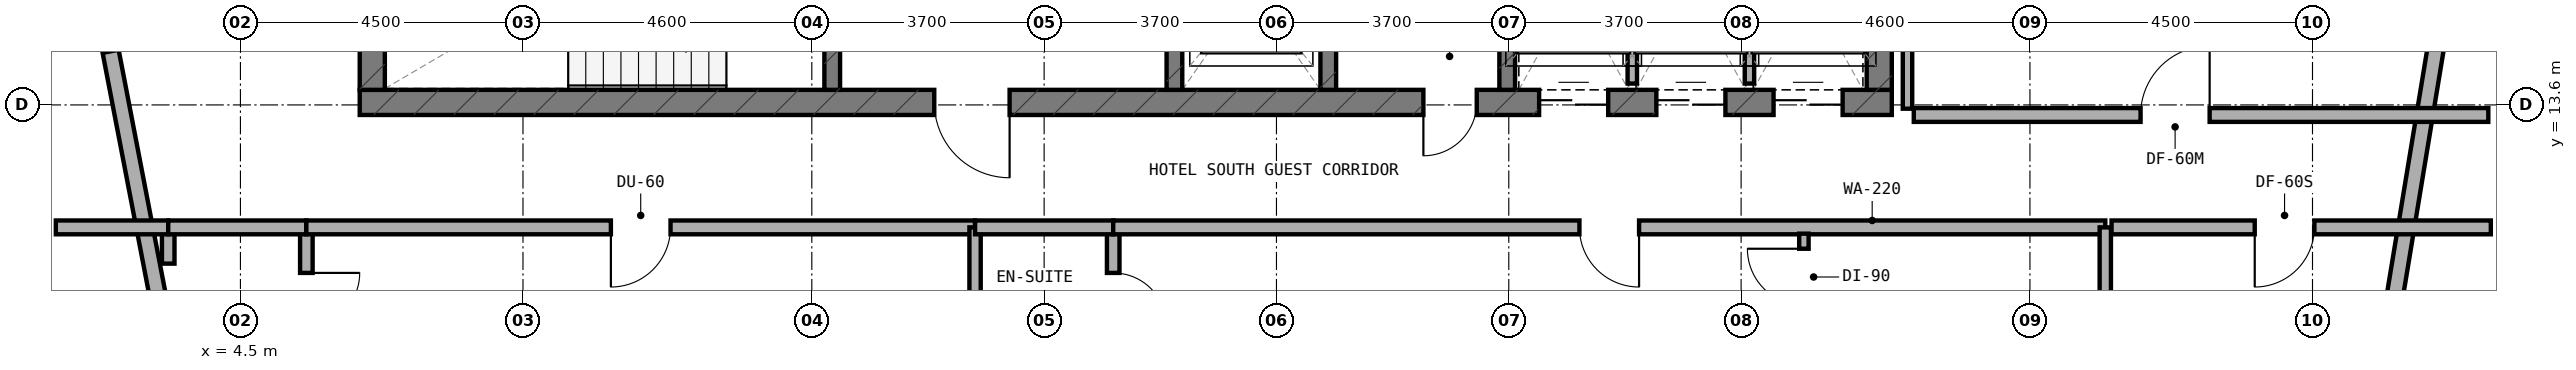
"""IFC4 building model, lengths in metres.
Left out: names, types, materials, properties, quantities, classifications, styles, units other than length and angle.
Written with IfcOpenShell. Run it as: python <this file> out.ifc"""

import sys

from ifc_helpers import new_model, si_unit, direction, frame, frame_2d, origin, place, context, subcontext, project, spatial, rectangle, extrude, element, fill, save


model = new_model("IFC4")
c1 = context("Model", 3, precision=1e-05, world=origin(), true_north=direction((0.0, 1.0)))
c2 = subcontext(c1, "Body", "Model", "MODEL_VIEW")
j1 = project(units=[si_unit("LENGTHUNIT", "METRE"), si_unit("PLANEANGLEUNIT", "RADIAN")], contexts=[c1])
p1 = place(None, origin())
s1 = spatial("IfcSite", under=j1, at=p1, CompositionType="ELEMENT")
p2 = place(p1, origin())
s2 = spatial("IfcBuilding", under=s1, at=p2, CompositionType="ELEMENT")
p3 = place(p2, frame((0.0, 0.0, 195.5)))
s3 = spatial("IfcBuildingStorey", under=s2, at=p3, CompositionType="ELEMENT", Elevation=195.5)
p4 = place(p3, frame((6.4, 13.64, 0.0), z_axis=(0.0, 0.0, 1.0), x_axis=(1.0, 0.0, 0.0)))
e1 = element("IfcWall", 1, at=p4, inside=s3, PredefinedType="SHEAR", context=c2, shape_type="SweptSolid", body=[
    extrude(rectangle(XDim=24.4, YDim=0.4, at=frame_2d((12.2, 0.0))), origin(), (0.0, 0.0, 1.0), 3.6),
])
p5 = place(p4, frame((9.15, 0.0, 0.0)))
e2 = element("IfcOpeningElement", 2, at=p5, cuts=e1, PredefinedType="OPENING", context=c2, shape_type="SweptSolid", body=[
    extrude(rectangle(XDim=1.2, YDim=2.15, at=frame_2d((0.6, 1.075))), frame((0.0, 0.21, 0.0), z_axis=(0.0, -1.0, 0.0), x_axis=(1.0, 0.0, 0.0)), (0.0, 0.0, 1.0), 0.42),
])
p6 = place(p4, frame((16.94, 0.0, 0.0)))
e3 = element("IfcOpeningElement", 3, at=p6, cuts=e1, PredefinedType="OPENING", context=c2, shape_type="SweptSolid", body=[
    extrude(rectangle(XDim=0.85, YDim=2.1, at=frame_2d((0.425, 1.05))), frame((0.0, 0.21, 0.0), z_axis=(0.0, -1.0, 0.0), x_axis=(1.0, 0.0, 0.0)), (0.0, 0.0, 1.0), 0.42),
])
p7 = place(p4, frame((18.783, 0.0, 0.0)))
e4 = element("IfcOpeningElement", 4, at=p7, cuts=e1, PredefinedType="OPENING", context=c2, shape_type="SweptSolid", body=[
    extrude(rectangle(XDim=1.1, YDim=2.15, at=frame_2d((0.55, 1.075))), frame((0.0, 0.21, 0.0), z_axis=(0.0, -1.0, 0.0), x_axis=(1.0, 0.0, 0.0)), (0.0, 0.0, 1.0), 0.42),
])
p8 = place(p4, frame((20.65, 0.0, 0.0)))
e5 = element("IfcOpeningElement", 5, at=p8, cuts=e1, PredefinedType="OPENING", context=c2, shape_type="SweptSolid", body=[
    extrude(rectangle(XDim=1.1, YDim=2.15, at=frame_2d((0.55, 1.075))), frame((0.0, 0.21, 0.0), z_axis=(0.0, -1.0, 0.0), x_axis=(1.0, 0.0, 0.0)), (0.0, 0.0, 1.0), 0.42),
])
p9 = place(p4, frame((22.517, 0.0, 0.0)))
e6 = element("IfcOpeningElement", 6, at=p9, cuts=e1, PredefinedType="OPENING", context=c2, shape_type="SweptSolid", body=[
    extrude(rectangle(XDim=1.1, YDim=2.15, at=frame_2d((0.55, 1.075))), frame((0.0, 0.21, 0.0), z_axis=(0.0, -1.0, 0.0), x_axis=(1.0, 0.0, 0.0)), (0.0, 0.0, 1.0), 0.42),
])
for number, where, z_axis, x_axis in (
    (7, (6.6, 13.84, 0.0), (0.0, 0.0, 1.0), (0.0, 1.0, 0.0)),
    (8, (30.6, 13.84, 0.0), (0.0, 0.0, 1.0), (0.0, 1.0, 0.0)),
):
    element("IfcWall", number, at=place(p3, frame(where, z_axis=z_axis, x_axis=x_axis)), inside=s3, PredefinedType="SHEAR", context=c2, shape_type="SweptSolid", body=[
        extrude(rectangle(XDim=3.16, YDim=0.4, at=frame_2d((1.58, 0.0))), origin(), (0.0, 0.0, 1.0), 3.6),
    ])
p10 = place(p3, frame((13.925, 13.84, 0.0), z_axis=(0.0, 0.0, 1.0), x_axis=(0.0, 1.0, 0.0)))
e9 = element("IfcWall", 9, at=p10, inside=s3, PredefinedType="STANDARD", context=c2, shape_type="SweptSolid", body=[
    extrude(rectangle(XDim=3.16, YDim=0.25, at=frame_2d((1.58, 0.0))), origin(), (0.0, 0.0, 1.0), 3.28),
])
p11 = place(p10, frame((0.98, 0.0, 0.0)))
e10 = element("IfcOpeningElement", 10, at=p11, cuts=e9, PredefinedType="OPENING", context=c2, shape_type="SweptSolid", body=[
    extrude(rectangle(XDim=1.1, YDim=2.15, at=frame_2d((0.55, 1.075))), frame((0.0, 0.135, 0.0), z_axis=(0.0, -1.0, 0.0), x_axis=(1.0, 0.0, 0.0)), (0.0, 0.0, 1.0), 0.27),
])
p12 = place(p3, frame((19.375, 13.84, 0.0), z_axis=(0.0, 0.0, 1.0), x_axis=(0.0, 1.0, 0.0)))
e11 = element("IfcWall", 11, at=p12, inside=s3, PredefinedType="STANDARD", context=c2, shape_type="SweptSolid", body=[
    extrude(rectangle(XDim=3.16, YDim=0.25, at=frame_2d((1.58, 0.0))), origin(), (0.0, 0.0, 1.0), 3.28),
])
p13 = place(p12, frame((0.98, 0.0, 0.0)))
e12 = element("IfcOpeningElement", 12, at=p13, cuts=e11, PredefinedType="OPENING", context=c2, shape_type="SweptSolid", body=[
    extrude(rectangle(XDim=1.1, YDim=2.15, at=frame_2d((0.55, 1.075))), frame((0.0, 0.135, 0.0), z_axis=(0.0, -1.0, 0.0), x_axis=(1.0, 0.0, 0.0)), (0.0, 0.0, 1.0), 0.27),
])
for number, where, z_axis, x_axis in (
    (13, (21.825, 13.84, 0.0), (0.0, 0.0, 1.0), (0.0, 1.0, 0.0)),
    (14, (24.675, 13.84, 0.0), (0.0, 0.0, 1.0), (0.0, 1.0, 0.0)),
):
    element("IfcWall", number, at=place(p3, frame(where, z_axis=z_axis, x_axis=x_axis)), inside=s3, PredefinedType="STANDARD", context=c2, shape_type="SweptSolid", body=[
        extrude(rectangle(XDim=3.16, YDim=0.25, at=frame_2d((1.58, 0.0))), origin(), (0.0, 0.0, 1.0), 3.28),
    ])
p14 = place(p3, frame((38.771, 10.313, 0.0), z_axis=(0.0, 0.0, 1.0), x_axis=(0.16277908586, 0.986662540693, 0.0)))
e15 = element("IfcWall", 15, at=p14, inside=s3, PredefinedType="STANDARD", context=c2, shape_type="SweptSolid", body=[
    extrude(rectangle(XDim=10.437, YDim=0.26, at=frame_2d((5.219, 0.0))), origin(), (0.0, 0.0, 1.0), 3.28),
])
p15 = place(p14, frame((5.81, 0.0, 0.85)))
e16 = element("IfcOpeningElement", 16, at=p15, cuts=e15, PredefinedType="OPENING", context=c2, shape_type="SweptSolid", body=[
    extrude(rectangle(XDim=2.1, YDim=1.5, at=frame_2d((1.05, 0.75))), frame((0.0, 0.14, 0.0), z_axis=(0.0, -1.0, 0.0), x_axis=(1.0, 0.0, 0.0)), (0.0, 0.0, 1.0), 0.28),
])
p16 = place(p3, frame((1.518, 19.199, 0.0), z_axis=(0.0, 0.0, 1.0), x_axis=(0.189254809039, -0.98192801022, 0.0)))
e17 = element("IfcWall", 17, at=p16, inside=s3, PredefinedType="STANDARD", context=c2, shape_type="SweptSolid", body=[
    extrude(rectangle(XDim=9.046, YDim=0.26, at=frame_2d((4.523, 0.0))), origin(), (0.0, 0.0, 1.0), 3.28),
])
p17 = place(p16, frame((2.733, 0.0, 0.85)))
e18 = element("IfcOpeningElement", 18, at=p17, cuts=e17, PredefinedType="OPENING", context=c2, shape_type="SweptSolid", body=[
    extrude(rectangle(XDim=2.1, YDim=1.5, at=frame_2d((1.05, 0.75))), frame((0.0, 0.14, 0.0), z_axis=(0.0, -1.0, 0.0), x_axis=(1.0, 0.0, 0.0)), (0.0, 0.0, 1.0), 0.28),
])
p18 = place(p3, frame((26.667, 13.94, 0.0), z_axis=(0.0, 0.0, 1.0), x_axis=(0.0, 1.0, 0.0)))
e19 = element("IfcWall", 19, at=p18, inside=s3, PredefinedType="PARTITIONING", context=c2, shape_type="SweptSolid", body=[
    extrude(rectangle(XDim=2.96, YDim=0.15, at=frame_2d((1.48, 0.0))), origin(), (0.0, 0.0, 1.0), 3.28),
])
p19 = place(p3, frame((28.533, 13.94, 0.0), z_axis=(0.0, 0.0, 1.0), x_axis=(0.0, 1.0, 0.0)))
e20 = element("IfcWall", 20, at=p19, inside=s3, PredefinedType="PARTITIONING", context=c2, shape_type="SweptSolid", body=[
    extrude(rectangle(XDim=2.96, YDim=0.15, at=frame_2d((1.48, 0.0))), origin(), (0.0, 0.0, 1.0), 2.955),
])
p20 = place(p3, frame((5.55, 9.45, 0.0), z_axis=(0.0, 0.0, 1.0), x_axis=(0.0, 1.0, 0.0)))
e21 = element("IfcWall", 21, at=p20, inside=s3, PredefinedType="PLUMBINGWALL", context=c2, shape_type="SweptSolid", body=[
    extrude(rectangle(XDim=2.1, YDim=0.2, at=frame_2d((1.05, 0.0))), origin(), (0.0, 0.0, 1.0), 3.28),
])
p21 = place(p20, frame((0.625, 0.0, 0.0)))
e22 = element("IfcOpeningElement", 22, at=p21, cuts=e21, PredefinedType="OPENING", context=c2, shape_type="SweptSolid", body=[
    extrude(rectangle(XDim=0.85, YDim=2.1, at=frame_2d((0.425, 1.05))), frame((0.0, 0.11, 0.0), z_axis=(0.0, -1.0, 0.0), x_axis=(1.0, 0.0, 0.0)), (0.0, 0.0, 1.0), 0.22),
])
p22 = place(p3, frame((3.35, 11.073, 0.0), z_axis=(0.0, 0.0, 1.0), x_axis=(0.0, 1.0, 0.0)))
e23 = element("IfcWall", 23, at=p22, inside=s3, PredefinedType="PLUMBINGWALL", context=c2, shape_type="SweptSolid", body=[
    extrude(rectangle(XDim=0.577, YDim=0.2, at=frame_2d((0.289, 0.0))), origin(), (0.0, 0.0, 1.0), 3.28),
])
p23 = place(p3, frame((1.56, 11.65, 0.0), z_axis=(0.0, 0.0, 1.0), x_axis=(1.0, 0.0, 0.0)))
e24 = element("IfcWall", 24, at=p23, inside=s3, PredefinedType="SOLIDWALL", context=c2, shape_type="SweptSolid", body=[
    extrude(rectangle(XDim=1.79, YDim=0.22, at=frame_2d((0.895, 0.0))), origin(), (0.0, 0.0, 1.0), 3.28),
])
p24 = place(p3, frame((3.35, 11.65, 0.0), z_axis=(0.0, 0.0, 1.0), x_axis=(1.0, 0.0, 0.0)))
e25 = element("IfcWall", 25, at=p24, inside=s3, PredefinedType="SOLIDWALL", context=c2, shape_type="SweptSolid", body=[
    extrude(rectangle(XDim=2.2, YDim=0.22, at=frame_2d((1.1, 0.0))), origin(), (0.0, 0.0, 1.0), 3.28),
])
p25 = place(p3, frame((5.55, 11.65, 0.0), z_axis=(0.0, 0.0, 1.0), x_axis=(1.0, 0.0, 0.0)))
e26 = element("IfcWall", 26, at=p25, inside=s3, PredefinedType="SOLIDWALL", context=c2, shape_type="SweptSolid", body=[
    extrude(rectangle(XDim=10.65, YDim=0.22, at=frame_2d((5.325, 0.0))), origin(), (0.0, 0.0, 1.0), 2.955),
])
p26 = place(p25, frame((4.85, 0.0, 0.0)))
e27 = element("IfcOpeningElement", 27, at=p26, cuts=e26, PredefinedType="OPENING", context=c2, shape_type="SweptSolid", body=[
    extrude(rectangle(XDim=0.95, YDim=2.1, at=frame_2d((0.475, 1.05))), frame((0.0, 0.12, 0.0), z_axis=(0.0, -1.0, 0.0), x_axis=(1.0, 0.0, 0.0)), (0.0, 0.0, 1.0), 0.24),
])
p27 = place(p3, frame((16.2, 5.46, 0.0), z_axis=(0.0, 0.0, 1.0), x_axis=(0.0, 1.0, 0.0)))
e28 = element("IfcWall", 28, at=p27, inside=s3, PredefinedType="SOLIDWALL", context=c2, shape_type="SweptSolid", body=[
    extrude(rectangle(XDim=6.19, YDim=0.18, at=frame_2d((3.095, 0.0))), origin(), (0.0, 0.0, 1.0), 2.895),
])
p28 = place(p3, frame((18.4, 9.45, 0.0), z_axis=(0.0, 0.0, 1.0), x_axis=(0.0, 1.0, 0.0)))
e29 = element("IfcWall", 29, at=p28, inside=s3, PredefinedType="PLUMBINGWALL", context=c2, shape_type="SweptSolid", body=[
    extrude(rectangle(XDim=2.1, YDim=0.2, at=frame_2d((1.05, 0.0))), origin(), (0.0, 0.0, 1.0), 2.895),
])
p29 = place(p28, frame((0.625, 0.0, 0.0)))
e30 = element("IfcOpeningElement", 30, at=p29, cuts=e29, PredefinedType="OPENING", context=c2, shape_type="SweptSolid", body=[
    extrude(rectangle(XDim=0.85, YDim=2.1, at=frame_2d((0.425, 1.05))), frame((0.0, 0.11, 0.0), z_axis=(0.0, -1.0, 0.0), x_axis=(1.0, 0.0, 0.0)), (0.0, 0.0, 1.0), 0.22),
])
p30 = place(p3, frame((16.2, 11.65, 0.0), z_axis=(0.0, 0.0, 1.0), x_axis=(1.0, 0.0, 0.0)))
e31 = element("IfcWall", 31, at=p30, inside=s3, PredefinedType="SOLIDWALL", context=c2, shape_type="SweptSolid", body=[
    extrude(rectangle(XDim=2.2, YDim=0.22, at=frame_2d((1.1, 0.0))), origin(), (0.0, 0.0, 1.0), 2.955),
])
p31 = place(p3, frame((18.4, 11.65, 0.0), z_axis=(0.0, 0.0, 1.0), x_axis=(1.0, 0.0, 0.0)))
e32 = element("IfcWall", 32, at=p31, inside=s3, PredefinedType="SOLIDWALL", context=c2, shape_type="SweptSolid", body=[
    extrude(rectangle(XDim=15.8, YDim=0.22, at=frame_2d((7.9, 0.0))), origin(), (0.0, 0.0, 1.0), 2.955),
])
p32 = place(p31, frame((7.425, 0.0, 0.0)))
e33 = element("IfcOpeningElement", 33, at=p32, cuts=e32, PredefinedType="OPENING", context=c2, shape_type="SweptSolid", body=[
    extrude(rectangle(XDim=0.95, YDim=2.1, at=frame_2d((0.475, 1.05))), frame((0.0, 0.12, 0.0), z_axis=(0.0, -1.0, 0.0), x_axis=(1.0, 0.0, 0.0)), (0.0, 0.0, 1.0), 0.24),
])
p33 = place(p3, frame((29.4, 6.047, 0.0), z_axis=(0.0, 0.0, 1.0), x_axis=(0.0, 1.0, 0.0)))
e34 = element("IfcWall", 34, at=p33, inside=s3, PredefinedType="PARTITIONING", context=c2, shape_type="SweptSolid", body=[
    extrude(rectangle(XDim=5.503, YDim=0.15, at=frame_2d((2.751, 0.0))), origin(), (0.0, 0.0, 1.0), 2.895),
])
p34 = place(p33, frame((4.363, 0.0, 0.0)))
e35 = element("IfcOpeningElement", 35, at=p34, cuts=e34, PredefinedType="OPENING", context=c2, shape_type="SweptSolid", body=[
    extrude(rectangle(XDim=0.9, YDim=2.1, at=frame_2d((0.45, 1.05))), frame((0.0, 0.085, 0.0), z_axis=(0.0, -1.0, 0.0), x_axis=(1.0, 0.0, 0.0)), (0.0, 0.0, 1.0), 0.17),
])
p35 = place(p3, frame((34.2, 6.872, 0.0), z_axis=(0.0, 0.0, 1.0), x_axis=(0.0, 1.0, 0.0)))
e36 = element("IfcWall", 36, at=p35, inside=s3, PredefinedType="SOLIDWALL", context=c2, shape_type="SweptSolid", body=[
    extrude(rectangle(XDim=4.778, YDim=0.18, at=frame_2d((2.389, 0.0))), origin(), (0.0, 0.0, 1.0), 2.895),
])
p36 = place(p3, frame((34.3, 11.65, 0.0), z_axis=(0.0, 0.0, 1.0), x_axis=(1.0, 0.0, 0.0)))
e37 = element("IfcWall", 37, at=p36, inside=s3, PredefinedType="SOLIDWALL", context=c2, shape_type="SweptSolid", body=[
    extrude(rectangle(XDim=6.04, YDim=0.22, at=frame_2d((3.02, 0.0))), origin(), (0.0, 0.0, 1.0), 2.895),
])
p37 = place(p36, frame((2.28, 0.0, 0.0)))
e38 = element("IfcOpeningElement", 38, at=p37, cuts=e37, PredefinedType="OPENING", context=c2, shape_type="SweptSolid", body=[
    extrude(rectangle(XDim=0.95, YDim=2.1, at=frame_2d((0.475, 1.05))), frame((0.0, 0.12, 0.0), z_axis=(0.0, -1.0, 0.0), x_axis=(1.0, 0.0, 0.0)), (0.0, 0.0, 1.0), 0.24),
])
p38 = place(p3, frame((31.05, 13.54, 0.0), z_axis=(0.0, 0.0, 1.0), x_axis=(0.0, 1.0, 0.0)))
e39 = element("IfcWall", 39, at=p38, inside=s3, PredefinedType="PARTITIONING", context=c2, shape_type="SweptSolid", body=[
    extrude(rectangle(XDim=6.66, YDim=0.15, at=frame_2d((3.33, 0.0))), origin(), (0.0, 0.0, 1.0), 2.955),
])
p39 = place(p3, frame((31.15, 13.44, 0.0), z_axis=(0.0, 0.0, 1.0), x_axis=(1.0, 0.0, 0.0)))
e40 = element("IfcWall", 40, at=p39, inside=s3, PredefinedType="SOLIDWALL", context=c2, shape_type="SweptSolid", body=[
    extrude(rectangle(XDim=9.15, YDim=0.22, at=frame_2d((4.575, 0.0))), origin(), (0.0, 0.0, 1.0), 2.895),
])
p40 = place(p39, frame((3.612, 0.0, 0.0)))
e41 = element("IfcOpeningElement", 41, at=p40, cuts=e40, PredefinedType="OPENING", context=c2, shape_type="SweptSolid", body=[
    extrude(rectangle(XDim=1.1, YDim=2.1, at=frame_2d((0.55, 1.05))), frame((0.0, 0.12, 0.0), z_axis=(0.0, -1.0, 0.0), x_axis=(1.0, 0.0, 0.0)), (0.0, 0.0, 1.0), 0.24),
])
p41 = place(p5, frame((1.2, 0.0, 0.0), z_axis=(0.0, 0.0, 1.0), x_axis=(-1.0, 0.0, 0.0)))
e42 = element("IfcDoor", 42, at=p41, inside=s3, OperationType="SINGLE_SWING_LEFT", PredefinedType="DOOR", context=c2, shape_type="SweptSolid", body=[
    extrude(rectangle(XDim=1.2, YDim=2.15, at=frame_2d((0.6, 1.075))), frame((0.0, 0.025, 0.0), z_axis=(0.0, -1.0, 0.0), x_axis=(1.0, 0.0, 0.0)), (0.0, 0.0, 1.0), 0.05),
])
fill(e2, e42)
p42 = place(p6, frame((0.85, 0.0, 0.0), z_axis=(0.0, 0.0, 1.0), x_axis=(-1.0, 0.0, 0.0)))
e43 = element("IfcDoor", 43, at=p42, inside=s3, OperationType="SINGLE_SWING_RIGHT", PredefinedType="DOOR", context=c2, shape_type="SweptSolid", body=[
    extrude(rectangle(XDim=0.85, YDim=2.1, at=frame_2d((0.425, 1.05))), frame((0.0, 0.025, 0.0), z_axis=(0.0, -1.0, 0.0), x_axis=(1.0, 0.0, 0.0)), (0.0, 0.0, 1.0), 0.05),
])
fill(e3, e43)
p43 = place(p7, frame((1.1, 0.0, 0.0), z_axis=(0.0, 0.0, 1.0), x_axis=(-1.0, 0.0, 0.0)))
e44 = element("IfcDoor", 44, at=p43, inside=s3, OperationType="DOUBLE_DOOR_SLIDING", PredefinedType="DOOR", context=c2, shape_type="SweptSolid", body=[
    extrude(rectangle(XDim=1.1, YDim=2.15, at=frame_2d((0.55, 1.075))), frame((0.0, 0.025, 0.0), z_axis=(0.0, -1.0, 0.0), x_axis=(1.0, 0.0, 0.0)), (0.0, 0.0, 1.0), 0.05),
])
fill(e4, e44)
p44 = place(p8, frame((1.1, 0.0, 0.0), z_axis=(0.0, 0.0, 1.0), x_axis=(-1.0, 0.0, 0.0)))
e45 = element("IfcDoor", 45, at=p44, inside=s3, OperationType="DOUBLE_DOOR_SLIDING", PredefinedType="DOOR", context=c2, shape_type="SweptSolid", body=[
    extrude(rectangle(XDim=1.1, YDim=2.15, at=frame_2d((0.55, 1.075))), frame((0.0, 0.025, 0.0), z_axis=(0.0, -1.0, 0.0), x_axis=(1.0, 0.0, 0.0)), (0.0, 0.0, 1.0), 0.05),
])
fill(e5, e45)
p45 = place(p9, frame((1.1, 0.0, 0.0), z_axis=(0.0, 0.0, 1.0), x_axis=(-1.0, 0.0, 0.0)))
e46 = element("IfcDoor", 46, at=p45, inside=s3, OperationType="DOUBLE_DOOR_SLIDING", PredefinedType="DOOR", context=c2, shape_type="SweptSolid", body=[
    extrude(rectangle(XDim=1.1, YDim=2.15, at=frame_2d((0.55, 1.075))), frame((0.0, 0.025, 0.0), z_axis=(0.0, -1.0, 0.0), x_axis=(1.0, 0.0, 0.0)), (0.0, 0.0, 1.0), 0.05),
])
fill(e6, e46)
p46 = place(p21, frame((0.85, 0.0, 0.0), z_axis=(0.0, 0.0, 1.0), x_axis=(-1.0, 0.0, 0.0)))
e47 = element("IfcDoor", 47, at=p46, inside=s3, OperationType="SINGLE_SWING_LEFT", PredefinedType="DOOR", context=c2, shape_type="SweptSolid", body=[
    extrude(rectangle(XDim=0.85, YDim=2.1, at=frame_2d((0.425, 1.05))), frame((0.0, 0.025, 0.0), z_axis=(0.0, -1.0, 0.0), x_axis=(1.0, 0.0, 0.0)), (0.0, 0.0, 1.0), 0.05),
])
fill(e22, e47)
p47 = place(p26, frame((0.95, 0.0, 0.0), z_axis=(0.0, 0.0, 1.0), x_axis=(-1.0, 0.0, 0.0)))
e48 = element("IfcDoor", 48, at=p47, inside=s3, OperationType="SINGLE_SWING_RIGHT", PredefinedType="DOOR", context=c2, shape_type="SweptSolid", body=[
    extrude(rectangle(XDim=0.95, YDim=2.1, at=frame_2d((0.475, 1.05))), frame((0.0, 0.025, 0.0), z_axis=(0.0, -1.0, 0.0), x_axis=(1.0, 0.0, 0.0)), (0.0, 0.0, 1.0), 0.05),
])
fill(e27, e48)
p48 = place(p29, frame((0.85, 0.0, 0.0), z_axis=(0.0, 0.0, 1.0), x_axis=(-1.0, 0.0, 0.0)))
e49 = element("IfcDoor", 49, at=p48, inside=s3, OperationType="SINGLE_SWING_RIGHT", PredefinedType="DOOR", context=c2, shape_type="SweptSolid", body=[
    extrude(rectangle(XDim=0.85, YDim=2.1, at=frame_2d((0.425, 1.05))), frame((0.0, 0.025, 0.0), z_axis=(0.0, -1.0, 0.0), x_axis=(1.0, 0.0, 0.0)), (0.0, 0.0, 1.0), 0.05),
])
fill(e30, e49)
p49 = place(p32, frame((0.95, 0.0, 0.0), z_axis=(0.0, 0.0, 1.0), x_axis=(-1.0, 0.0, 0.0)))
e50 = element("IfcDoor", 50, at=p49, inside=s3, OperationType="SINGLE_SWING_LEFT", PredefinedType="DOOR", context=c2, shape_type="SweptSolid", body=[
    extrude(rectangle(XDim=0.95, YDim=2.1, at=frame_2d((0.475, 1.05))), frame((0.0, 0.025, 0.0), z_axis=(0.0, -1.0, 0.0), x_axis=(1.0, 0.0, 0.0)), (0.0, 0.0, 1.0), 0.05),
])
fill(e33, e50)
p50 = place(p34, origin())
e51 = element("IfcDoor", 51, at=p50, inside=s3, OperationType="SINGLE_SWING_RIGHT", PredefinedType="DOOR", context=c2, shape_type="SweptSolid", body=[
    extrude(rectangle(XDim=0.9, YDim=2.1, at=frame_2d((0.45, 1.05))), frame((0.0, 0.025, 0.0), z_axis=(0.0, -1.0, 0.0), x_axis=(1.0, 0.0, 0.0)), (0.0, 0.0, 1.0), 0.05),
])
fill(e35, e51)
p51 = place(p37, frame((0.95, 0.0, 0.0), z_axis=(0.0, 0.0, 1.0), x_axis=(-1.0, 0.0, 0.0)))
e52 = element("IfcDoor", 52, at=p51, inside=s3, OperationType="SINGLE_SWING_RIGHT", PredefinedType="DOOR", context=c2, shape_type="SweptSolid", body=[
    extrude(rectangle(XDim=0.95, YDim=2.1, at=frame_2d((0.475, 1.05))), frame((0.0, 0.025, 0.0), z_axis=(0.0, -1.0, 0.0), x_axis=(1.0, 0.0, 0.0)), (0.0, 0.0, 1.0), 0.05),
])
fill(e38, e52)
p52 = place(p40, origin())
e53 = element("IfcDoor", 53, at=p52, inside=s3, OperationType="SINGLE_SWING_RIGHT", PredefinedType="DOOR", context=c2, shape_type="SweptSolid", body=[
    extrude(rectangle(XDim=1.1, YDim=2.1, at=frame_2d((0.55, 1.05))), frame((0.0, 0.025, 0.0), z_axis=(0.0, -1.0, 0.0), x_axis=(1.0, 0.0, 0.0)), (0.0, 0.0, 1.0), 0.05),
])
fill(e41, e53)
save(model, sys.argv[1])
